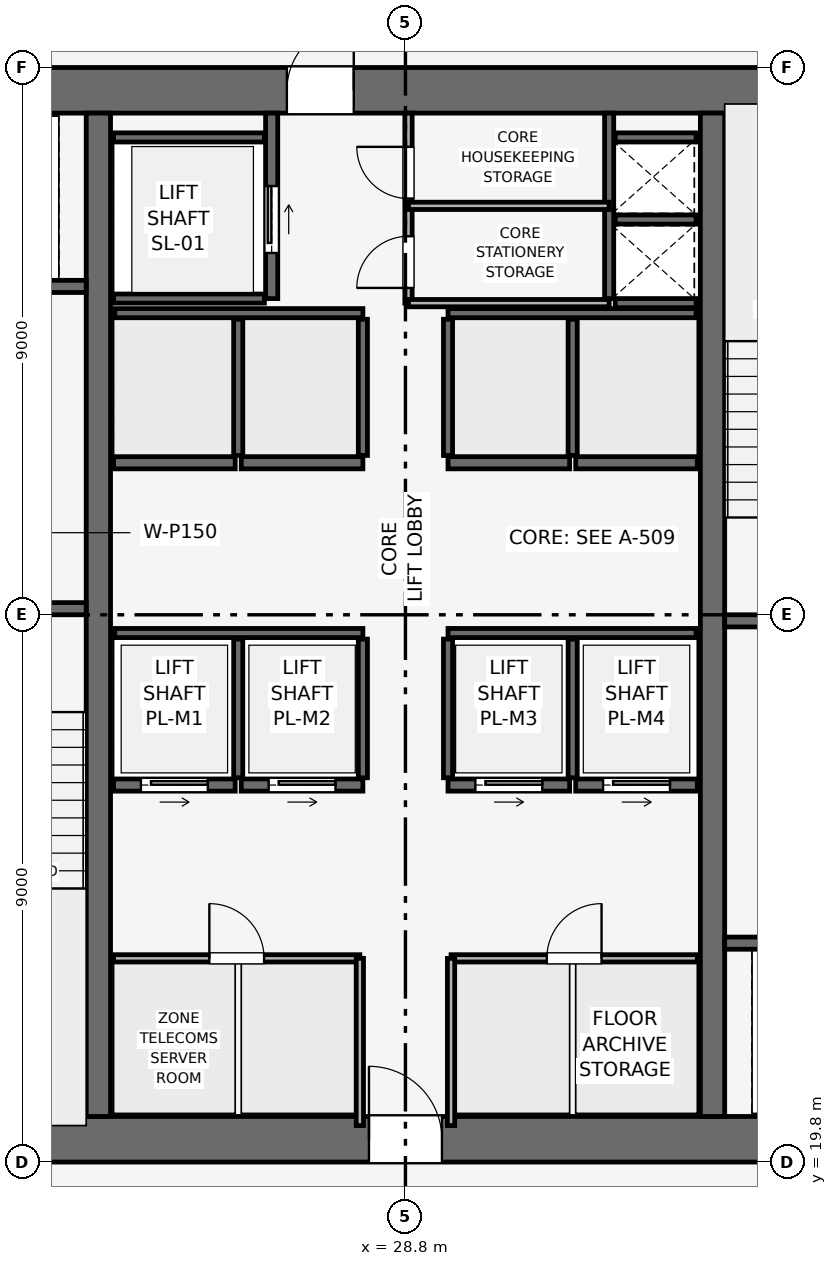
"""IFC4 building model, lengths in metres.
Left out: names, types, materials, properties, quantities, classifications, styles, units other than length and angle.
Written with IfcOpenShell. Run it as: python <this file> out.ifc"""

import sys

from ifc_helpers import new_model, si_unit, direction, frame, frame_2d, origin, place, context, subcontext, project, spatial, rectangle, extrude, element, fill, save


model = new_model("IFC4")
c1 = context("Model", 3, precision=1e-05, world=origin(), true_north=direction((0.0, 1.0)))
c2 = subcontext(c1, "Body", "Model", "MODEL_VIEW")
j1 = project(units=[si_unit("LENGTHUNIT", "METRE"), si_unit("PLANEANGLEUNIT", "RADIAN")], contexts=[c1])
p1 = place(None, origin())
s1 = spatial("IfcSite", under=j1, at=p1, CompositionType="ELEMENT")
p2 = place(p1, origin())
s2 = spatial("IfcBuilding", under=s1, at=p2, CompositionType="ELEMENT")
p3 = place(p2, frame((0.0, 0.0, 211.2)))
s3 = spatial("IfcBuildingStorey", under=s2, at=p3, CompositionType="ELEMENT", Elevation=211.2)
p4 = place(p3, frame((19.8, 20.175, 0.0), z_axis=(0.0, 0.0, 1.0), x_axis=(1.0, 0.0, 0.0)))
e1 = element("IfcWall", 1, at=p4, inside=s3, PredefinedType="SHEAR", context=c2, shape_type="SweptSolid", body=[
    extrude(rectangle(XDim=18.0, YDim=0.75, at=frame_2d((9.0, 0.0))), origin(), (0.0, 0.0, 1.0), 3.75),
])
p5 = place(p4, frame((8.4, 0.0, 0.0)))
e2 = element("IfcOpeningElement", 2, at=p5, cuts=e1, PredefinedType="OPENING", context=c2, shape_type="SweptSolid", body=[
    extrude(rectangle(XDim=1.2, YDim=2.2, at=frame_2d((0.6, 1.1))), frame((0.0, 0.385, 0.0), z_axis=(0.0, -1.0, 0.0), x_axis=(1.0, 0.0, 0.0)), (0.0, 0.0, 1.0), 0.77),
])
p6 = place(p3, frame((19.8, 37.425, 0.0), z_axis=(0.0, 0.0, 1.0), x_axis=(1.0, 0.0, 0.0)))
e3 = element("IfcWall", 3, at=p6, inside=s3, PredefinedType="SHEAR", context=c2, shape_type="SweptSolid", body=[
    extrude(rectangle(XDim=18.0, YDim=0.75, at=frame_2d((9.0, 0.0))), origin(), (0.0, 0.0, 1.0), 3.75),
])
p7 = place(p6, frame((7.05, 0.0, 0.0)))
e4 = element("IfcOpeningElement", 4, at=p7, cuts=e3, PredefinedType="OPENING", context=c2, shape_type="SweptSolid", body=[
    extrude(rectangle(XDim=1.1, YDim=2.15, at=frame_2d((0.55, 1.075))), frame((0.0, 0.385, 0.0), z_axis=(0.0, -1.0, 0.0), x_axis=(1.0, 0.0, 0.0)), (0.0, 0.0, 1.0), 0.77),
])
for number, where, z_axis, x_axis in (
    (5, (23.75, 20.55, 0.0), (0.0, 0.0, 1.0), (0.0, 1.0, 0.0)),
    (6, (33.85, 20.55, 0.0), (0.0, 0.0, 1.0), (0.0, 1.0, 0.0)),
):
    element("IfcWall", number, at=place(p3, frame(where, z_axis=z_axis, x_axis=x_axis)), inside=s3, PredefinedType="SHEAR", context=c2, shape_type="SweptSolid", body=[
        extrude(rectangle(XDim=16.5, YDim=0.4, at=frame_2d((8.25, 0.0))), origin(), (0.0, 0.0, 1.0), 3.75),
    ])
p8 = place(p3, frame((20.4, 28.9, 0.0), z_axis=(0.0, 0.0, 1.0), x_axis=(1.0, 0.0, 0.0)))
e7 = element("IfcWall", 7, at=p8, inside=s3, PredefinedType="SHEAR", context=c2, shape_type="SweptSolid", body=[
    extrude(rectangle(XDim=3.15, YDim=0.2, at=frame_2d((1.575, 0.0))), origin(), (0.0, 0.0, 1.0), 3.5),
])
p9 = place(p8, frame((0.8, 0.0, 0.0)))
e8 = element("IfcOpeningElement", 8, at=p9, cuts=e7, PredefinedType="OPENING", context=c2, shape_type="SweptSolid", body=[
    extrude(rectangle(XDim=1.0, YDim=2.1, at=frame_2d((0.5, 1.05))), frame((0.0, 0.11, 0.0), z_axis=(0.0, -1.0, 0.0), x_axis=(1.0, 0.0, 0.0)), (0.0, 0.0, 1.0), 0.22),
])
p10 = place(p3, frame((34.05, 28.7, 0.0), z_axis=(0.0, 0.0, 1.0), x_axis=(1.0, 0.0, 0.0)))
e9 = element("IfcWall", 9, at=p10, inside=s3, PredefinedType="SHEAR", context=c2, shape_type="SweptSolid", body=[
    extrude(rectangle(XDim=3.15, YDim=0.2, at=frame_2d((1.575, 0.0))), origin(), (0.0, 0.0, 1.0), 3.5),
])
p11 = place(p10, frame((0.8, 0.0, 0.0)))
e10 = element("IfcOpeningElement", 10, at=p11, cuts=e9, PredefinedType="OPENING", context=c2, shape_type="SweptSolid", body=[
    extrude(rectangle(XDim=1.0, YDim=2.1, at=frame_2d((0.5, 1.05))), frame((0.0, 0.11, 0.0), z_axis=(0.0, -1.0, 0.0), x_axis=(1.0, 0.0, 0.0)), (0.0, 0.0, 1.0), 0.22),
])
p12 = place(p3, frame((32.15, 34.0, 0.0), z_axis=(0.0, 0.0, 1.0), x_axis=(0.0, 1.0, 0.0)))
e11 = element("IfcWall", 11, at=p12, inside=s3, PredefinedType="SHEAR", context=c2, shape_type="SweptSolid", body=[
    extrude(rectangle(XDim=3.05, YDim=0.15, at=frame_2d((1.525, 0.0))), origin(), (0.0, 0.0, 1.0), 3.5),
])
for number, where, z_axis, x_axis in (
    (12, (32.25, 33.925, 0.0), (0.0, 0.0, 1.0), (1.0, 0.0, 0.0)),
    (13, (32.25, 35.3, 0.0), (0.0, 0.0, 1.0), (1.0, 0.0, 0.0)),
):
    element("IfcWall", number, at=place(p3, frame(where, z_axis=z_axis, x_axis=x_axis)), inside=s3, PredefinedType="SHEAR", context=c2, shape_type="SweptSolid", body=[
        extrude(rectangle(XDim=1.33, YDim=0.15, at=frame_2d((0.665, 0.0))), origin(), (0.0, 0.0, 1.0), 3.5),
    ])
p13 = place(p3, frame((20.5, 34.2, 0.0), z_axis=(0.0, 0.0, 1.0), x_axis=(1.0, 0.0, 0.0)))
e14 = element("IfcWall", 14, at=p13, inside=s3, PredefinedType="SHEAR", context=c2, shape_type="SweptSolid", body=[
    extrude(rectangle(XDim=3.05, YDim=0.2, at=frame_2d((1.525, 0.0))), origin(), (0.0, 0.0, 1.0), 3.5),
])
p14 = place(p13, frame((0.75, 0.0, 0.0)))
e15 = element("IfcOpeningElement", 15, at=p14, cuts=e14, PredefinedType="OPENING", context=c2, shape_type="SweptSolid", body=[
    extrude(rectangle(XDim=1.1, YDim=2.15, at=frame_2d((0.55, 1.075))), frame((0.0, 0.11, 0.0), z_axis=(0.0, -1.0, 0.0), x_axis=(1.0, 0.0, 0.0)), (0.0, 0.0, 1.0), 0.22),
])
p15 = place(p3, frame((34.05, 23.4, 0.0), z_axis=(0.0, 0.0, 1.0), x_axis=(1.0, 0.0, 0.0)))
e16 = element("IfcWall", 16, at=p15, inside=s3, PredefinedType="SHEAR", context=c2, shape_type="SweptSolid", body=[
    extrude(rectangle(XDim=3.05, YDim=0.2, at=frame_2d((1.525, 0.0))), origin(), (0.0, 0.0, 1.0), 3.5),
])
p16 = place(p15, frame((1.2, 0.0, 0.0)))
e17 = element("IfcOpeningElement", 17, at=p16, cuts=e16, PredefinedType="OPENING", context=c2, shape_type="SweptSolid", body=[
    extrude(rectangle(XDim=1.1, YDim=2.15, at=frame_2d((0.55, 1.075))), frame((0.0, 0.11, 0.0), z_axis=(0.0, -1.0, 0.0), x_axis=(1.0, 0.0, 0.0)), (0.0, 0.0, 1.0), 0.22),
])
p17 = place(p3, frame((26.6, 34.0, 0.0), z_axis=(0.0, 0.0, 1.0), x_axis=(0.0, 1.0, 0.0)))
e18 = element("IfcWall", 18, at=p17, inside=s3, PredefinedType="SHEAR", context=c2, shape_type="SweptSolid", body=[
    extrude(rectangle(XDim=3.05, YDim=0.2, at=frame_2d((1.525, 0.0))), origin(), (0.0, 0.0, 1.0), 3.5),
])
p18 = place(p17, frame((0.75, 0.0, 0.0)))
e19 = element("IfcOpeningElement", 19, at=p18, cuts=e18, PredefinedType="OPENING", context=c2, shape_type="SweptSolid", body=[
    extrude(rectangle(XDim=1.1, YDim=2.15, at=frame_2d((0.55, 1.075))), frame((0.0, 0.11, 0.0), z_axis=(0.0, -1.0, 0.0), x_axis=(1.0, 0.0, 0.0)), (0.0, 0.0, 1.0), 0.22),
])
for number, where, z_axis, x_axis in (
    (20, (24.0, 34.0, 0.0), (0.0, 0.0, 1.0), (1.0, 0.0, 0.0)),
    (21, (24.0, 36.65, 0.0), (0.0, 0.0, 1.0), (1.0, 0.0, 0.0)),
):
    element("IfcWall", number, at=place(p3, frame(where, z_axis=z_axis, x_axis=x_axis)), inside=s3, PredefinedType="SHEAR", context=c2, shape_type="SweptSolid", body=[
        extrude(rectangle(XDim=2.48, YDim=0.15, at=frame_2d((1.24, 0.0))), origin(), (0.0, 0.0, 1.0), 3.5),
    ])
p19 = place(p3, frame((24.0, 26.0, 0.0), z_axis=(0.0, 0.0, 1.0), x_axis=(1.0, 0.0, 0.0)))
e22 = element("IfcWall", 22, at=p19, inside=s3, PredefinedType="SHEAR", context=c2, shape_type="SweptSolid", body=[
    extrude(rectangle(XDim=2.0, YDim=0.2, at=frame_2d((1.0, 0.0))), origin(), (0.0, 0.0, 1.0), 3.5),
])
p20 = place(p19, frame((0.45, 0.0, 0.0)))
e23 = element("IfcOpeningElement", 23, at=p20, cuts=e22, PredefinedType="OPENING", context=c2, shape_type="SweptSolid", body=[
    extrude(rectangle(XDim=1.1, YDim=2.15, at=frame_2d((0.55, 1.075))), frame((0.0, 0.11, 0.0), z_axis=(0.0, -1.0, 0.0), x_axis=(1.0, 0.0, 0.0)), (0.0, 0.0, 1.0), 0.22),
])
p21 = place(p3, frame((26.1, 26.0, 0.0), z_axis=(0.0, 0.0, 1.0), x_axis=(1.0, 0.0, 0.0)))
e24 = element("IfcWall", 24, at=p21, inside=s3, PredefinedType="SHEAR", context=c2, shape_type="SweptSolid", body=[
    extrude(rectangle(XDim=2.0, YDim=0.2, at=frame_2d((1.0, 0.0))), origin(), (0.0, 0.0, 1.0), 3.5),
])
p22 = place(p21, frame((0.45, 0.0, 0.0)))
e25 = element("IfcOpeningElement", 25, at=p22, cuts=e24, PredefinedType="OPENING", context=c2, shape_type="SweptSolid", body=[
    extrude(rectangle(XDim=1.1, YDim=2.15, at=frame_2d((0.55, 1.075))), frame((0.0, 0.11, 0.0), z_axis=(0.0, -1.0, 0.0), x_axis=(1.0, 0.0, 0.0)), (0.0, 0.0, 1.0), 0.22),
])
p23 = place(p3, frame((29.5, 26.0, 0.0), z_axis=(0.0, 0.0, 1.0), x_axis=(1.0, 0.0, 0.0)))
e26 = element("IfcWall", 26, at=p23, inside=s3, PredefinedType="SHEAR", context=c2, shape_type="SweptSolid", body=[
    extrude(rectangle(XDim=2.0, YDim=0.2, at=frame_2d((1.0, 0.0))), origin(), (0.0, 0.0, 1.0), 3.5),
])
p24 = place(p23, frame((0.45, 0.0, 0.0)))
e27 = element("IfcOpeningElement", 27, at=p24, cuts=e26, PredefinedType="OPENING", context=c2, shape_type="SweptSolid", body=[
    extrude(rectangle(XDim=1.1, YDim=2.15, at=frame_2d((0.55, 1.075))), frame((0.0, 0.11, 0.0), z_axis=(0.0, -1.0, 0.0), x_axis=(1.0, 0.0, 0.0)), (0.0, 0.0, 1.0), 0.22),
])
p25 = place(p3, frame((31.6, 26.0, 0.0), z_axis=(0.0, 0.0, 1.0), x_axis=(1.0, 0.0, 0.0)))
e28 = element("IfcWall", 28, at=p25, inside=s3, PredefinedType="SHEAR", context=c2, shape_type="SweptSolid", body=[
    extrude(rectangle(XDim=2.0, YDim=0.2, at=frame_2d((1.0, 0.0))), origin(), (0.0, 0.0, 1.0), 3.5),
])
p26 = place(p25, frame((0.45, 0.0, 0.0)))
e29 = element("IfcOpeningElement", 29, at=p26, cuts=e28, PredefinedType="OPENING", context=c2, shape_type="SweptSolid", body=[
    extrude(rectangle(XDim=1.1, YDim=2.15, at=frame_2d((0.55, 1.075))), frame((0.0, 0.11, 0.0), z_axis=(0.0, -1.0, 0.0), x_axis=(1.0, 0.0, 0.0)), (0.0, 0.0, 1.0), 0.22),
])
for number, where, z_axis, x_axis in (
    (30, (24.0, 31.3, 0.0), (0.0, 0.0, 1.0), (1.0, 0.0, 0.0)),
    (31, (26.1, 31.3, 0.0), (0.0, 0.0, 1.0), (1.0, 0.0, 0.0)),
    (32, (29.5, 31.3, 0.0), (0.0, 0.0, 1.0), (1.0, 0.0, 0.0)),
    (33, (31.6, 31.3, 0.0), (0.0, 0.0, 1.0), (1.0, 0.0, 0.0)),
):
    element("IfcWall", number, at=place(p3, frame(where, z_axis=z_axis, x_axis=x_axis)), inside=s3, PredefinedType="SHEAR", context=c2, shape_type="SweptSolid", body=[
        extrude(rectangle(XDim=2.0, YDim=0.2, at=frame_2d((1.0, 0.0))), origin(), (0.0, 0.0, 1.0), 3.5),
    ])
p27 = place(p3, frame((32.25, 36.65, 0.0), z_axis=(0.0, 0.0, 1.0), x_axis=(1.0, 0.0, 0.0)))
e34 = element("IfcWall", 34, at=p27, inside=s3, PredefinedType="SHEAR", context=c2, shape_type="SweptSolid", body=[
    extrude(rectangle(XDim=1.33, YDim=0.15, at=frame_2d((0.665, 0.0))), origin(), (0.0, 0.0, 1.0), 3.5),
])
for number, where, z_axis, x_axis in (
    (35, (24.02, 28.5, 0.0), (0.0, 0.0, 1.0), (1.0, 0.0, 0.0)),
    (36, (29.5, 28.5, 0.0), (0.0, 0.0, 1.0), (1.0, 0.0, 0.0)),
):
    element("IfcWall", number, at=place(p3, frame(where, z_axis=z_axis, x_axis=x_axis)), inside=s3, PredefinedType="SHEAR", context=c2, shape_type="SweptSolid", body=[
        extrude(rectangle(XDim=4.08, YDim=0.15, at=frame_2d((2.04, 0.0))), origin(), (0.0, 0.0, 1.0), 3.5),
    ])
for number, where, z_axis, x_axis in (
    (37, (26.05, 26.12, 0.0), (0.0, 0.0, 1.0), (0.0, 1.0, 0.0)),
    (38, (28.1, 26.12, 0.0), (0.0, 0.0, 1.0), (0.0, 1.0, 0.0)),
    (39, (29.5, 26.12, 0.0), (0.0, 0.0, 1.0), (0.0, 1.0, 0.0)),
    (40, (31.55, 26.12, 0.0), (0.0, 0.0, 1.0), (0.0, 1.0, 0.0)),
):
    element("IfcWall", number, at=place(p3, frame(where, z_axis=z_axis, x_axis=x_axis)), inside=s3, PredefinedType="SHEAR", context=c2, shape_type="SweptSolid", body=[
        extrude(rectangle(XDim=2.28, YDim=0.15, at=frame_2d((1.14, 0.0))), origin(), (0.0, 0.0, 1.0), 3.5),
    ])
for number, where, z_axis, x_axis in (
    (41, (24.02, 33.76, 0.0), (0.0, 0.0, 1.0), (1.0, 0.0, 0.0)),
    (42, (29.5, 33.76, 0.0), (0.0, 0.0, 1.0), (1.0, 0.0, 0.0)),
):
    element("IfcWall", number, at=place(p3, frame(where, z_axis=z_axis, x_axis=x_axis)), inside=s3, PredefinedType="SHEAR", context=c2, shape_type="SweptSolid", body=[
        extrude(rectangle(XDim=4.08, YDim=0.15, at=frame_2d((2.04, 0.0))), origin(), (0.0, 0.0, 1.0), 3.5),
    ])
for number, where, z_axis, x_axis in (
    (43, (26.05, 31.42, 0.0), (0.0, 0.0, 1.0), (0.0, 1.0, 0.0)),
    (44, (28.1, 31.42, 0.0), (0.0, 0.0, 1.0), (0.0, 1.0, 0.0)),
    (45, (29.5, 31.42, 0.0), (0.0, 0.0, 1.0), (0.0, 1.0, 0.0)),
    (46, (31.55, 31.42, 0.0), (0.0, 0.0, 1.0), (0.0, 1.0, 0.0)),
):
    element("IfcWall", number, at=place(p3, frame(where, z_axis=z_axis, x_axis=x_axis)), inside=s3, PredefinedType="SHEAR", context=c2, shape_type="SweptSolid", body=[
        extrude(rectangle(XDim=2.24, YDim=0.15, at=frame_2d((1.12, 0.0))), origin(), (0.0, 0.0, 1.0), 3.5),
    ])
p28 = place(p3, frame((28.85, 33.925, 0.0), z_axis=(0.0, 0.0, 1.0), x_axis=(0.0, 1.0, 0.0)))
e47 = element("IfcWall", 47, at=p28, inside=s3, PredefinedType="PARTITIONING", context=c2, shape_type="SweptSolid", body=[
    extrude(rectangle(XDim=3.125, YDim=0.12, at=frame_2d((1.562, 0.0))), origin(), (0.0, 0.0, 1.0), 3.5),
])
p29 = place(p28, frame((0.25, 0.0, 0.0)))
e48 = element("IfcOpeningElement", 48, at=p29, cuts=e47, PredefinedType="OPENING", context=c2, shape_type="SweptSolid", body=[
    extrude(rectangle(XDim=0.85, YDim=2.1, at=frame_2d((0.425, 1.05))), frame((0.0, 0.07, 0.0), z_axis=(0.0, -1.0, 0.0), x_axis=(1.0, 0.0, 0.0)), (0.0, 0.0, 1.0), 0.14),
])
p30 = place(p28, frame((1.72, 0.0, 0.0)))
e49 = element("IfcOpeningElement", 49, at=p30, cuts=e47, PredefinedType="OPENING", context=c2, shape_type="SweptSolid", body=[
    extrude(rectangle(XDim=0.85, YDim=2.1, at=frame_2d((0.425, 1.05))), frame((0.0, 0.07, 0.0), z_axis=(0.0, -1.0, 0.0), x_axis=(1.0, 0.0, 0.0)), (0.0, 0.0, 1.0), 0.14),
])
for number, where, z_axis, x_axis in (
    (50, (28.85, 35.525, 0.0), (0.0, 0.0, 1.0), (1.0, 0.0, 0.0)),
    (51, (28.85, 33.925, 0.0), (0.0, 0.0, 1.0), (1.0, 0.0, 0.0)),
):
    element("IfcWall", number, at=place(p3, frame(where, z_axis=z_axis, x_axis=x_axis)), inside=s3, PredefinedType="PARTITIONING", context=c2, shape_type="SweptSolid", body=[
        extrude(rectangle(XDim=3.3, YDim=0.12, at=frame_2d((1.65, 0.0))), origin(), (0.0, 0.0, 1.0), 3.5),
    ])
p31 = place(p3, frame((24.0, 23.15, 0.0), z_axis=(0.0, 0.0, 1.0), x_axis=(1.0, 0.0, 0.0)))
e52 = element("IfcWall", 52, at=p31, inside=s3, PredefinedType="PARTITIONING", context=c2, shape_type="SweptSolid", body=[
    extrude(rectangle(XDim=4.05, YDim=0.12, at=frame_2d((2.025, 0.0))), origin(), (0.0, 0.0, 1.0), 3.5),
])
p32 = place(p31, frame((1.575, 0.0, 0.0)))
e53 = element("IfcOpeningElement", 53, at=p32, cuts=e52, PredefinedType="OPENING", context=c2, shape_type="SweptSolid", body=[
    extrude(rectangle(XDim=0.9, YDim=2.1, at=frame_2d((0.45, 1.05))), frame((0.0, 0.07, 0.0), z_axis=(0.0, -1.0, 0.0), x_axis=(1.0, 0.0, 0.0)), (0.0, 0.0, 1.0), 0.14),
])
p33 = place(p3, frame((28.05, 20.4, 0.0), z_axis=(0.0, 0.0, 1.0), x_axis=(0.0, 1.0, 0.0)))
e54 = element("IfcWall", 54, at=p33, inside=s3, PredefinedType="PARTITIONING", context=c2, shape_type="SweptSolid", body=[
    extrude(rectangle(XDim=2.75, YDim=0.12, at=frame_2d((1.375, 0.0))), origin(), (0.0, 0.0, 1.0), 3.5),
])
p34 = place(p3, frame((29.55, 23.15, 0.0), z_axis=(0.0, 0.0, 1.0), x_axis=(1.0, 0.0, 0.0)))
e55 = element("IfcWall", 55, at=p34, inside=s3, PredefinedType="PARTITIONING", context=c2, shape_type="SweptSolid", body=[
    extrude(rectangle(XDim=4.05, YDim=0.12, at=frame_2d((2.025, 0.0))), origin(), (0.0, 0.0, 1.0), 3.5),
])
p35 = place(p34, frame((1.575, 0.0, 0.0)))
e56 = element("IfcOpeningElement", 56, at=p35, cuts=e55, PredefinedType="OPENING", context=c2, shape_type="SweptSolid", body=[
    extrude(rectangle(XDim=0.9, YDim=2.1, at=frame_2d((0.45, 1.05))), frame((0.0, 0.07, 0.0), z_axis=(0.0, -1.0, 0.0), x_axis=(1.0, 0.0, 0.0)), (0.0, 0.0, 1.0), 0.14),
])
p36 = place(p3, frame((29.55, 20.4, 0.0), z_axis=(0.0, 0.0, 1.0), x_axis=(0.0, 1.0, 0.0)))
e57 = element("IfcWall", 57, at=p36, inside=s3, PredefinedType="PARTITIONING", context=c2, shape_type="SweptSolid", body=[
    extrude(rectangle(XDim=2.75, YDim=0.12, at=frame_2d((1.375, 0.0))), origin(), (0.0, 0.0, 1.0), 3.5),
])
p37 = place(p18, origin())
e58 = element("IfcDoor", 58, at=p37, inside=s3, OperationType="SLIDING_TO_RIGHT", PredefinedType="DOOR", context=c2, shape_type="SweptSolid", body=[
    extrude(rectangle(XDim=1.1, YDim=2.15, at=frame_2d((0.55, 1.075))), frame((0.0, 0.025, 0.0), z_axis=(0.0, -1.0, 0.0), x_axis=(1.0, 0.0, 0.0)), (0.0, 0.0, 1.0), 0.05),
])
fill(e19, e58)
p38 = place(p20, origin())
e59 = element("IfcDoor", 59, at=p38, inside=s3, OperationType="SLIDING_TO_RIGHT", PredefinedType="DOOR", context=c2, shape_type="SweptSolid", body=[
    extrude(rectangle(XDim=1.1, YDim=2.15, at=frame_2d((0.55, 1.075))), frame((0.0, 0.025, 0.0), z_axis=(0.0, -1.0, 0.0), x_axis=(1.0, 0.0, 0.0)), (0.0, 0.0, 1.0), 0.05),
])
fill(e23, e59)
p39 = place(p22, origin())
e60 = element("IfcDoor", 60, at=p39, inside=s3, OperationType="SLIDING_TO_RIGHT", PredefinedType="DOOR", context=c2, shape_type="SweptSolid", body=[
    extrude(rectangle(XDim=1.1, YDim=2.15, at=frame_2d((0.55, 1.075))), frame((0.0, 0.025, 0.0), z_axis=(0.0, -1.0, 0.0), x_axis=(1.0, 0.0, 0.0)), (0.0, 0.0, 1.0), 0.05),
])
fill(e25, e60)
p40 = place(p24, origin())
e61 = element("IfcDoor", 61, at=p40, inside=s3, OperationType="SLIDING_TO_RIGHT", PredefinedType="DOOR", context=c2, shape_type="SweptSolid", body=[
    extrude(rectangle(XDim=1.1, YDim=2.15, at=frame_2d((0.55, 1.075))), frame((0.0, 0.025, 0.0), z_axis=(0.0, -1.0, 0.0), x_axis=(1.0, 0.0, 0.0)), (0.0, 0.0, 1.0), 0.05),
])
fill(e27, e61)
p41 = place(p26, origin())
e62 = element("IfcDoor", 62, at=p41, inside=s3, OperationType="SLIDING_TO_RIGHT", PredefinedType="DOOR", context=c2, shape_type="SweptSolid", body=[
    extrude(rectangle(XDim=1.1, YDim=2.15, at=frame_2d((0.55, 1.075))), frame((0.0, 0.025, 0.0), z_axis=(0.0, -1.0, 0.0), x_axis=(1.0, 0.0, 0.0)), (0.0, 0.0, 1.0), 0.05),
])
fill(e29, e62)
p42 = place(p29, origin())
e63 = element("IfcDoor", 63, at=p42, inside=s3, OperationType="SINGLE_SWING_LEFT", PredefinedType="DOOR", context=c2, shape_type="SweptSolid", body=[
    extrude(rectangle(XDim=0.85, YDim=2.1, at=frame_2d((0.425, 1.05))), frame((0.0, 0.025, 0.0), z_axis=(0.0, -1.0, 0.0), x_axis=(1.0, 0.0, 0.0)), (0.0, 0.0, 1.0), 0.05),
])
fill(e48, e63)
p43 = place(p30, origin())
e64 = element("IfcDoor", 64, at=p43, inside=s3, OperationType="SINGLE_SWING_RIGHT", PredefinedType="DOOR", context=c2, shape_type="SweptSolid", body=[
    extrude(rectangle(XDim=0.85, YDim=2.1, at=frame_2d((0.425, 1.05))), frame((0.0, 0.025, 0.0), z_axis=(0.0, -1.0, 0.0), x_axis=(1.0, 0.0, 0.0)), (0.0, 0.0, 1.0), 0.05),
])
fill(e49, e64)
p44 = place(p32, origin())
e65 = element("IfcDoor", 65, at=p44, inside=s3, OperationType="SINGLE_SWING_LEFT", PredefinedType="DOOR", context=c2, shape_type="SweptSolid", body=[
    extrude(rectangle(XDim=0.9, YDim=2.1, at=frame_2d((0.45, 1.05))), frame((0.0, 0.025, 0.0), z_axis=(0.0, -1.0, 0.0), x_axis=(1.0, 0.0, 0.0)), (0.0, 0.0, 1.0), 0.05),
])
fill(e53, e65)
p45 = place(p35, origin())
e66 = element("IfcDoor", 66, at=p45, inside=s3, OperationType="SINGLE_SWING_RIGHT", PredefinedType="DOOR", context=c2, shape_type="SweptSolid", body=[
    extrude(rectangle(XDim=0.9, YDim=2.1, at=frame_2d((0.45, 1.05))), frame((0.0, 0.025, 0.0), z_axis=(0.0, -1.0, 0.0), x_axis=(1.0, 0.0, 0.0)), (0.0, 0.0, 1.0), 0.05),
])
fill(e56, e66)
p46 = place(p5, origin())
e67 = element("IfcDoor", 67, at=p46, inside=s3, OperationType="SINGLE_SWING_LEFT", PredefinedType="DOOR", context=c2, shape_type="SweptSolid", body=[
    extrude(rectangle(XDim=1.2, YDim=2.2, at=frame_2d((0.6, 1.1))), frame((0.0, 0.025, 0.0), z_axis=(0.0, -1.0, 0.0), x_axis=(1.0, 0.0, 0.0)), (0.0, 0.0, 1.0), 0.05),
])
fill(e2, e67)
p47 = place(p7, origin())
e68 = element("IfcDoor", 68, at=p47, inside=s3, OperationType="SINGLE_SWING_RIGHT", PredefinedType="DOOR", context=c2, shape_type="SweptSolid", body=[
    extrude(rectangle(XDim=1.1, YDim=2.15, at=frame_2d((0.55, 1.075))), frame((0.0, 0.025, 0.0), z_axis=(0.0, -1.0, 0.0), x_axis=(1.0, 0.0, 0.0)), (0.0, 0.0, 1.0), 0.05),
])
fill(e4, e68)
save(model, sys.argv[1])
